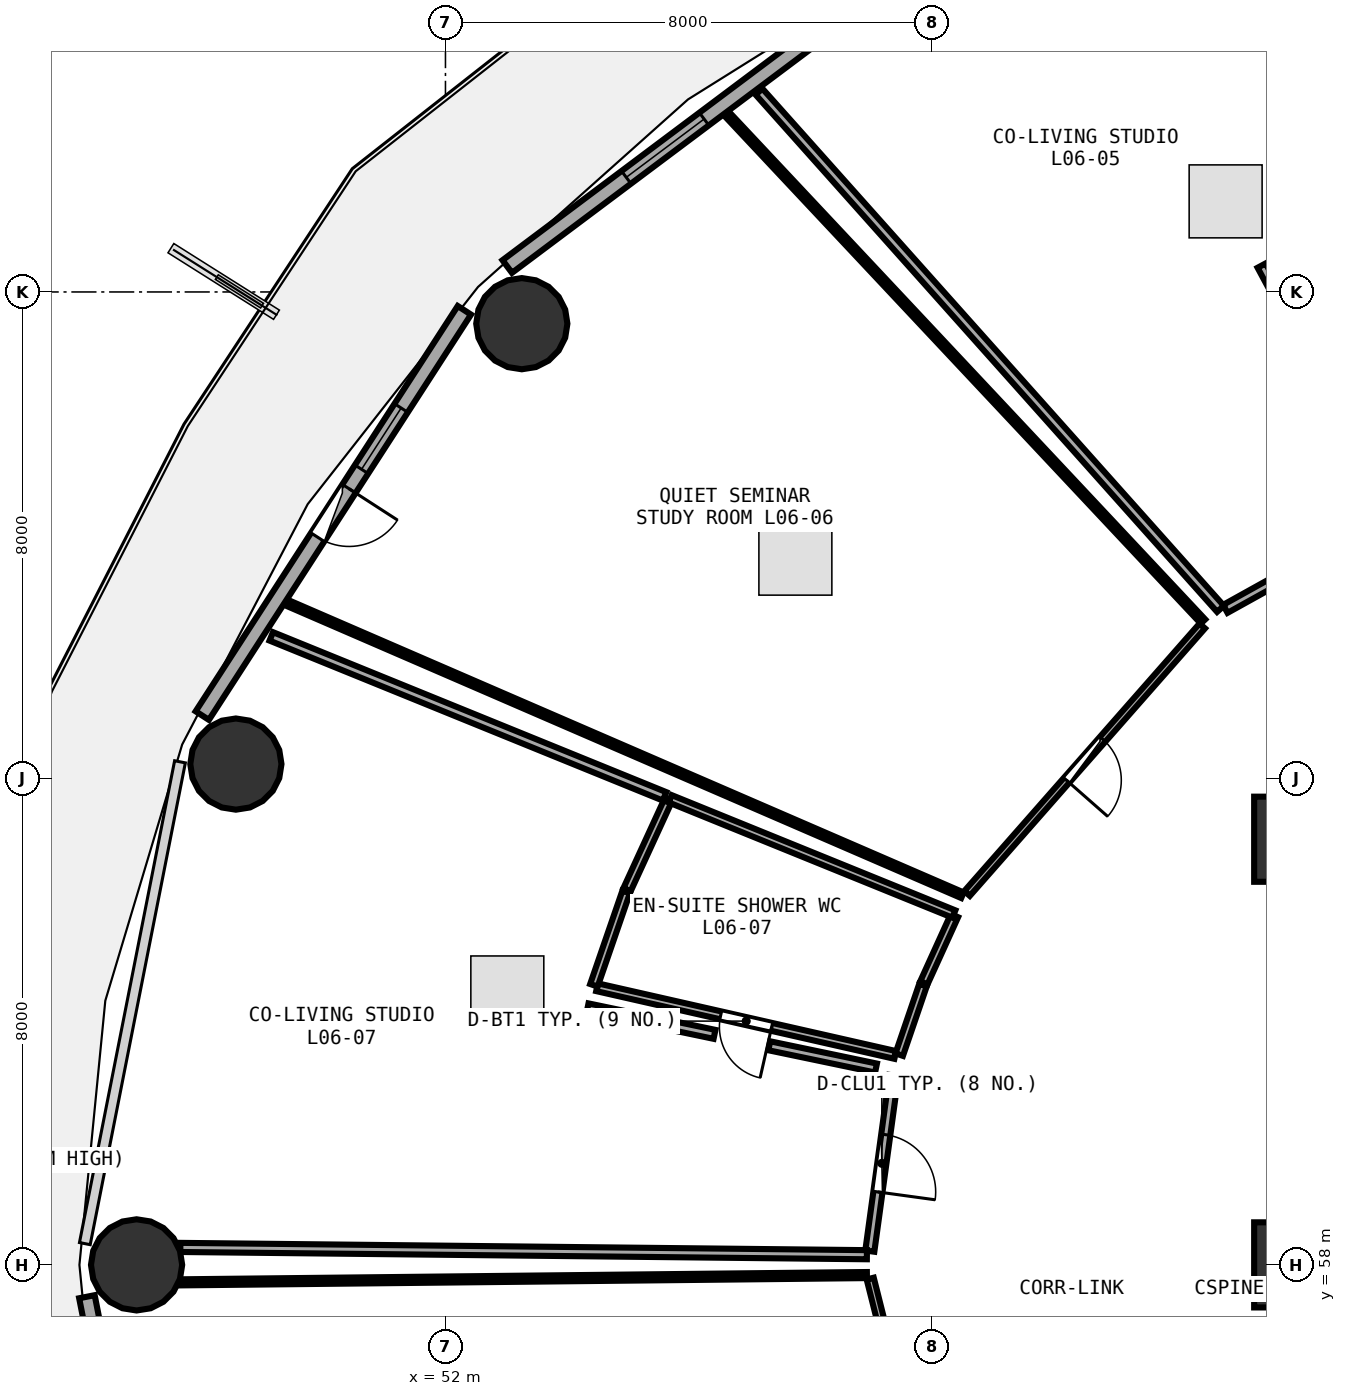
"""IFC4 building model, lengths in metres.
Left out: names, types, materials, properties, quantities, classifications, styles, units other than length and angle.
Written with IfcOpenShell. Run it as: python <this file> out.ifc"""

import sys

from ifc_helpers import new_model, si_unit, direction, frame, frame_2d, origin, origin_2d, place, context, subcontext, project, spatial, rectangle, circle, extrude, element, fill, save


model = new_model("IFC4")
c1 = context("Model", 3, precision=1e-05, world=origin(), true_north=direction((0.0, 1.0)))
c2 = subcontext(c1, "Body", "Model", "MODEL_VIEW")
j1 = project(units=[si_unit("LENGTHUNIT", "METRE"), si_unit("PLANEANGLEUNIT", "RADIAN")], contexts=[c1])
p1 = place(None, origin())
s1 = spatial("IfcSite", under=j1, at=p1, CompositionType="ELEMENT")
p2 = place(p1, origin())
s2 = spatial("IfcBuilding", under=s1, at=p2, CompositionType="ELEMENT")
p3 = place(p2, frame((0.0, 0.0, 26.25)))
s3 = spatial("IfcBuildingStorey", under=s2, at=p3, CompositionType="ELEMENT", Elevation=26.25)
for number, where, z_axis, x_axis in (
    (1, (66.0, 65.0, 0.0), (0.0, 0.0, 1.0), (1.0, 0.0, 0.0)),
    (2, (66.0, 58.0, 0.0), (0.0, 0.0, 1.0), (1.0, 0.0, 0.0)),
):
    element("IfcColumn", number, at=place(p3, frame(where, z_axis=z_axis, x_axis=x_axis)), inside=s3, PredefinedType="PILASTER", context=c2, shape_type="SweptSolid", body=[
        extrude(rectangle(XDim=1.4, YDim=1.4, at=origin_2d()), origin(), (0.0, 0.0, 1.0), 3.75),
    ])
for number, where, z_axis, x_axis in (
    (3, (53.256, 73.478, 0.0), (0.0, 0.0, 1.0), (1.0, 0.0, 0.0)),
    (4, (48.553, 66.236, 0.0), (0.0, 0.0, 1.0), (1.0, 0.0, 0.0)),
    (5, (46.92, 58.0, 0.0), (0.0, 0.0, 1.0), (1.0, 0.0, 0.0)),
):
    element("IfcColumn", number, at=place(p3, frame(where, z_axis=z_axis, x_axis=x_axis)), inside=s3, PredefinedType="COLUMN", context=c2, shape_type="SweptSolid", body=[
        extrude(circle(Radius=0.75, at=origin_2d()), origin(), (0.0, 0.0, 1.0), 3.75),
    ])
p4 = place(p3, frame((59.651, 79.389, 0.0), z_axis=(0.0, 0.0, 1.0), x_axis=(-0.80030733173, -0.599590005569, 0.0)))
e6 = element("IfcWall", 6, at=p4, inside=s3, PredefinedType="SOLIDWALL", context=c2, shape_type="SweptSolid", body=[
    extrude(rectangle(XDim=8.291, YDim=0.26, at=frame_2d((4.145, 0.0))), origin(), (0.0, 0.0, 1.0), 3.475),
])
p5 = place(p4, frame((4.245, 0.0, 0.85)))
e7 = element("IfcOpeningElement", 7, at=p5, cuts=e6, PredefinedType="OPENING", context=c2, shape_type="SweptSolid", body=[
    extrude(rectangle(XDim=1.6, YDim=1.45, at=frame_2d((0.8, 0.725))), frame((0.0, 0.14, 0.0), z_axis=(0.0, -1.0, 0.0), x_axis=(1.0, 0.0, 0.0)), (0.0, 0.0, 1.0), 0.28),
])
p6 = place(p3, frame((52.311, 73.698, 0.0), z_axis=(0.0, 0.0, 1.0), x_axis=(-0.543005114258, -0.839729388488, 0.0)))
e8 = element("IfcWall", 8, at=p6, inside=s3, PredefinedType="SOLIDWALL", context=c2, shape_type="SweptSolid", body=[
    extrude(rectangle(XDim=7.938, YDim=0.26, at=frame_2d((3.969, 0.0))), origin(), (0.0, 0.0, 1.0), 3.475),
])
p7 = place(p6, frame((3.494, 0.0, 0.0)))
e9 = element("IfcOpeningElement", 9, at=p7, cuts=e8, PredefinedType="OPENING", context=c2, shape_type="SweptSolid", body=[
    extrude(rectangle(XDim=0.95, YDim=2.1, at=frame_2d((0.475, 1.05))), frame((0.0, 0.14, 0.0), z_axis=(0.0, -1.0, 0.0), x_axis=(1.0, 0.0, 0.0)), (0.0, 0.0, 1.0), 0.28),
])
p8 = place(p6, frame((1.914, 0.0, 0.85)))
e10 = element("IfcOpeningElement", 10, at=p8, cuts=e8, PredefinedType="OPENING", context=c2, shape_type="SweptSolid", body=[
    extrude(rectangle(XDim=1.2, YDim=1.45, at=frame_2d((0.6, 0.725))), frame((0.0, 0.14, 0.0), z_axis=(0.0, -1.0, 0.0), x_axis=(1.0, 0.0, 0.0)), (0.0, 0.0, 1.0), 0.28),
])
p9 = place(p3, frame((46.104, 57.477, 0.0), z_axis=(0.0, 0.0, 1.0), x_axis=(0.193726159581, -0.98105564322, 0.0)))
e11 = element("IfcWall", 11, at=p9, inside=s3, PredefinedType="SOLIDWALL", context=c2, shape_type="SweptSolid", body=[
    extrude(rectangle(XDim=7.703, YDim=0.26, at=frame_2d((3.851, 0.0))), origin(), (0.0, 0.0, 1.0), 3.475),
])
p10 = place(p9, frame((3.051, 0.0, 0.85)))
e12 = element("IfcOpeningElement", 12, at=p10, cuts=e11, PredefinedType="OPENING", context=c2, shape_type="SweptSolid", body=[
    extrude(rectangle(XDim=1.6, YDim=1.45, at=frame_2d((0.8, 0.725))), frame((0.0, 0.14, 0.0), z_axis=(0.0, -1.0, 0.0), x_axis=(1.0, 0.0, 0.0)), (0.0, 0.0, 1.0), 0.28),
])
p11 = place(p3, frame((67.571, 70.313, 0.0), z_axis=(0.0, 0.0, 1.0), x_axis=(-0.874179278891, -0.48560332408, 0.0)))
e13 = element("IfcWall", 13, at=p11, inside=s3, PredefinedType="PARTITIONING", context=c2, shape_type="SweptSolid", body=[
    extrude(rectangle(XDim=3.14, YDim=0.15, at=frame_2d((1.57, 0.0))), origin(), (0.0, 0.0, 1.0), 3.48),
])
p12 = place(p11, frame((1.095, 0.0, 0.0)))
e14 = element("IfcOpeningElement", 14, at=p12, cuts=e13, PredefinedType="OPENING", context=c2, shape_type="SweptSolid", body=[
    extrude(rectangle(XDim=0.95, YDim=2.08, at=frame_2d((0.475, 1.04))), frame((0.0, 0.085, 0.0), z_axis=(0.0, -1.0, 0.0), x_axis=(1.0, 0.0, 0.0)), (0.0, 0.0, 1.0), 0.17),
])
p13 = place(p3, frame((64.446, 68.507, 0.0), z_axis=(0.0, 0.0, 1.0), x_axis=(-0.660323401664, -0.75098136143, 0.0)))
e15 = element("IfcWall", 15, at=p13, inside=s3, PredefinedType="PARTITIONING", context=c2, shape_type="SweptSolid", body=[
    extrude(rectangle(XDim=5.857, YDim=0.12, at=frame_2d((2.929, 0.0))), origin(), (0.0, 0.0, 1.0), 2.875),
])
p14 = place(p13, frame((2.479, 0.0, 0.0)))
e16 = element("IfcOpeningElement", 16, at=p14, cuts=e15, PredefinedType="OPENING", context=c2, shape_type="SweptSolid", body=[
    extrude(rectangle(XDim=0.9, YDim=2.08, at=frame_2d((0.45, 1.04))), frame((0.0, 0.07, 0.0), z_axis=(0.0, -1.0, 0.0), x_axis=(1.0, 0.0, 0.0)), (0.0, 0.0, 1.0), 0.14),
])
p15 = place(p3, frame((59.397, 61.452, 0.0), z_axis=(0.0, 0.0, 1.0), x_axis=(-0.975187669184, 0.221379786503, 0.0)))
e17 = element("IfcWall", 17, at=p15, inside=s3, PredefinedType="PLUMBINGWALL", context=c2, shape_type="SweptSolid", body=[
    extrude(rectangle(XDim=5.029, YDim=0.13, at=frame_2d((2.514, 0.0))), origin(), (0.0, 0.0, 1.0), 3.175),
])
p16 = place(p15, frame((2.084, 0.0, 0.0)))
e18 = element("IfcOpeningElement", 18, at=p16, cuts=e17, PredefinedType="OPENING", context=c2, shape_type="SweptSolid", body=[
    extrude(rectangle(XDim=0.86, YDim=2.05, at=frame_2d((0.43, 1.025))), frame((0.0, 0.075, 0.0), z_axis=(0.0, -1.0, 0.0), x_axis=(1.0, 0.0, 0.0)), (0.0, 0.0, 1.0), 0.15),
])
p17 = place(p3, frame((59.375, 61.115, 0.0), z_axis=(0.0, 0.0, 1.0), x_axis=(-0.135838186105, -0.990731036758, 0.0)))
e19 = element("IfcWall", 19, at=p17, inside=s3, PredefinedType="PARTITIONING", context=c2, shape_type="SweptSolid", body=[
    extrude(rectangle(XDim=2.915, YDim=0.15, at=frame_2d((1.458, 0.0))), origin(), (0.0, 0.0, 1.0), 3.48),
])
p18 = place(p17, frame((0.983, 0.0, 0.0)))
e20 = element("IfcOpeningElement", 20, at=p18, cuts=e19, PredefinedType="OPENING", context=c2, shape_type="SweptSolid", body=[
    extrude(rectangle(XDim=0.95, YDim=2.08, at=frame_2d((0.475, 1.04))), frame((0.0, 0.085, 0.0), z_axis=(0.0, -1.0, 0.0), x_axis=(1.0, 0.0, 0.0)), (0.0, 0.0, 1.0), 0.17),
])
p19 = place(p3, frame((58.986, 57.775, 0.0), z_axis=(0.0, 0.0, 1.0), x_axis=(0.244192294026, -0.969726829338, 0.0)))
e21 = element("IfcWall", 21, at=p19, inside=s3, PredefinedType="PARTITIONING", context=c2, shape_type="SweptSolid", body=[
    extrude(rectangle(XDim=5.651, YDim=0.12, at=frame_2d((2.825, 0.0))), origin(), (0.0, 0.0, 1.0), 3.48),
])
p20 = place(p19, frame((2.375, 0.0, 0.0)))
e22 = element("IfcOpeningElement", 22, at=p20, cuts=e21, PredefinedType="OPENING", context=c2, shape_type="SweptSolid", body=[
    extrude(rectangle(XDim=0.9, YDim=2.08, at=frame_2d((0.45, 1.04))), frame((0.0, 0.07, 0.0), z_axis=(0.0, -1.0, 0.0), x_axis=(1.0, 0.0, 0.0)), (0.0, 0.0, 1.0), 0.14),
])
p21 = place(p3, frame((64.746, 68.789, 0.0), z_axis=(0.0, 0.0, 1.0), x_axis=(-0.66580890104, 0.746122313897, 0.0)))
e23 = element("IfcWall", 23, at=p21, inside=s3, PredefinedType="PARTITIONING", context=c2, shape_type="SweptSolid", body=[
    extrude(rectangle(XDim=11.399, YDim=0.15, at=frame_2d((5.7, 0.0))), origin(), (0.0, 0.0, 1.0), 2.875),
])
p22 = place(p3, frame((65.423, 74.434, 0.0), z_axis=(0.0, 0.0, 1.0), x_axis=(0.473660949034, -0.880707275637, 0.0)))
e24 = element("IfcWall", 24, at=p22, inside=s3, PredefinedType="PARTITIONING", context=c2, shape_type="SweptSolid", body=[
    extrude(rectangle(XDim=1.891, YDim=0.15, at=frame_2d((0.946, 0.0))), origin(), (0.0, 0.0, 1.0), 3.175),
])
p23 = place(p3, frame((60.502, 64.079, 0.0), z_axis=(0.0, 0.0, 1.0), x_axis=(-0.917695041134, 0.397285554077, 0.0)))
e25 = element("IfcWall", 25, at=p23, inside=s3, PredefinedType="PARTITIONING", context=c2, shape_type="SweptSolid", body=[
    extrude(rectangle(XDim=12.07, YDim=0.1, at=frame_2d((6.035, 0.0))), origin(), (0.0, 0.0, 1.0), 2.875),
])
p24 = place(p3, frame((56.632, 76.922, 0.0), z_axis=(0.0, 0.0, 1.0), x_axis=(0.684261294523, -0.729236916796, 0.0)))
e26 = element("IfcWall", 26, at=p24, inside=s3, PredefinedType="PARTITIONING", context=c2, shape_type="SweptSolid", body=[
    extrude(rectangle(XDim=11.438, YDim=0.1, at=frame_2d((5.719, 0.0))), origin(), (0.0, 0.0, 1.0), 2.875),
])
p25 = place(p3, frame((60.372, 63.745, 0.0), z_axis=(0.0, 0.0, 1.0), x_axis=(-0.4138937247, -0.910325208183, 0.0)))
e27 = element("IfcWall", 27, at=p25, inside=s3, PredefinedType="PLUMBINGWALL", context=c2, shape_type="SweptSolid", body=[
    extrude(rectangle(XDim=1.216, YDim=0.13, at=frame_2d((0.608, 0.0))), origin(), (0.0, 0.0, 1.0), 3.48),
])
p26 = place(p3, frame((59.854, 62.601, 0.0), z_axis=(0.0, 0.0, 1.0), x_axis=(-0.323735286305, -0.946147696928, 0.0)))
e28 = element("IfcWall", 28, at=p26, inside=s3, PredefinedType="PLUMBINGWALL", context=c2, shape_type="SweptSolid", body=[
    extrude(rectangle(XDim=1.208, YDim=0.13, at=frame_2d((0.604, 0.0))), origin(), (0.0, 0.0, 1.0), 3.48),
])
p27 = place(p3, frame((54.441, 62.598, 0.0), z_axis=(0.0, 0.0, 1.0), x_axis=(0.326356647952, 0.945246707657, 0.0)))
e29 = element("IfcWall", 29, at=p27, inside=s3, PredefinedType="PLUMBINGWALL", context=c2, shape_type="SweptSolid", body=[
    extrude(rectangle(XDim=1.624, YDim=0.13, at=frame_2d((0.812, 0.0))), origin(), (0.0, 0.0, 1.0), 3.48),
])
p28 = place(p3, frame((54.986, 64.17, 0.0), z_axis=(0.0, 0.0, 1.0), x_axis=(0.41762687648, 0.908618617486, 0.0)))
e30 = element("IfcWall", 30, at=p28, inside=s3, PredefinedType="PLUMBINGWALL", context=c2, shape_type="SweptSolid", body=[
    extrude(rectangle(XDim=1.634, YDim=0.13, at=frame_2d((0.817, 0.0))), origin(), (0.0, 0.0, 1.0), 2.875),
])
p29 = place(p3, frame((55.696, 65.666, 0.0), z_axis=(0.0, 0.0, 1.0), x_axis=(0.926504606816, -0.376283421835, 0.0)))
e31 = element("IfcWall", 31, at=p29, inside=s3, PredefinedType="PLUMBINGWALL", context=c2, shape_type="SweptSolid", body=[
    extrude(rectangle(XDim=5.036, YDim=0.13, at=frame_2d((2.518, 0.0))), origin(), (0.0, 0.0, 1.0), 2.875),
])
p30 = place(p3, frame((58.931, 58.167, 0.0), z_axis=(0.0, 0.0, 1.0), x_axis=(-0.999943877154, 0.010594458135, 0.0)))
e32 = element("IfcWall", 32, at=p30, inside=s3, PredefinedType="PARTITIONING", context=c2, shape_type="SweptSolid", body=[
    extrude(rectangle(XDim=11.292, YDim=0.15, at=frame_2d((5.646, 0.0))), origin(), (0.0, 0.0, 1.0), 2.875),
])
p31 = place(p3, frame((49.135, 68.336, 0.0), z_axis=(0.0, 0.0, 1.0), x_axis=(0.926325178802, -0.376724917038, 0.0)))
e33 = element("IfcWall", 33, at=p31, inside=s3, PredefinedType="PARTITIONING", context=c2, shape_type="SweptSolid", body=[
    extrude(rectangle(XDim=6.983, YDim=0.15, at=frame_2d((3.492, 0.0))), origin(), (0.0, 0.0, 1.0), 2.875),
])
p32 = place(p3, frame((54.337, 62.227, 0.0), z_axis=(0.0, 0.0, 1.0), x_axis=(0.978922282622, -0.204233113343, 0.0)))
e34 = element("IfcWall", 34, at=p32, inside=s3, PredefinedType="PARTITIONING", context=c2, shape_type="SweptSolid", body=[
    extrude(rectangle(XDim=2.133, YDim=0.15, at=frame_2d((1.066, 0.0))), origin(), (0.0, 0.0, 1.0), 3.175),
])
p33 = place(p3, frame((57.325, 61.603, 0.0), z_axis=(0.0, 0.0, 1.0), x_axis=(0.978929424395, -0.204198878681, 0.0)))
e35 = element("IfcWall", 35, at=p33, inside=s3, PredefinedType="PARTITIONING", context=c2, shape_type="SweptSolid", body=[
    extrude(rectangle(XDim=1.793, YDim=0.15, at=frame_2d((0.897, 0.0))), origin(), (0.0, 0.0, 1.0), 3.235),
])
p34 = place(p3, frame((47.64, 57.713, 0.0), z_axis=(0.0, 0.0, 1.0), x_axis=(0.999943877154, 0.010594458135, 0.0)))
e36 = element("IfcWall", 36, at=p34, inside=s3, PredefinedType="PARTITIONING", context=c2, shape_type="SweptSolid", body=[
    extrude(rectangle(XDim=11.292, YDim=0.1, at=frame_2d((5.646, 0.0))), origin(), (0.0, 0.0, 1.0), 2.875),
])
p35 = place(p5, origin())
e37 = element("IfcWindow", 37, at=p35, inside=s3, PartitioningType="SINGLE_PANEL", PredefinedType="WINDOW", context=c2, shape_type="SweptSolid", body=[
    extrude(rectangle(XDim=1.6, YDim=1.45, at=frame_2d((0.8, 0.725))), frame((0.0, 0.03, 0.0), z_axis=(0.0, -1.0, 0.0), x_axis=(1.0, 0.0, 0.0)), (0.0, 0.0, 1.0), 0.06),
])
fill(e7, e37)
p36 = place(p7, frame((0.95, 0.0, 0.0), z_axis=(0.0, 0.0, 1.0), x_axis=(-1.0, 0.0, 0.0)))
e38 = element("IfcDoor", 38, at=p36, inside=s3, OperationType="SINGLE_SWING_RIGHT", PredefinedType="DOOR", context=c2, shape_type="SweptSolid", body=[
    extrude(rectangle(XDim=0.95, YDim=2.1, at=frame_2d((0.475, 1.05))), frame((0.0, 0.025, 0.0), z_axis=(0.0, -1.0, 0.0), x_axis=(1.0, 0.0, 0.0)), (0.0, 0.0, 1.0), 0.05),
])
fill(e9, e38)
p37 = place(p8, origin())
e39 = element("IfcWindow", 39, at=p37, inside=s3, PartitioningType="SINGLE_PANEL", PredefinedType="WINDOW", context=c2, shape_type="SweptSolid", body=[
    extrude(rectangle(XDim=1.2, YDim=1.45, at=frame_2d((0.6, 0.725))), frame((0.0, 0.03, 0.0), z_axis=(0.0, -1.0, 0.0), x_axis=(1.0, 0.0, 0.0)), (0.0, 0.0, 1.0), 0.06),
])
fill(e10, e39)
p38 = place(p14, origin())
e40 = element("IfcDoor", 40, at=p38, inside=s3, OperationType="SINGLE_SWING_RIGHT", PredefinedType="DOOR", context=c2, shape_type="SweptSolid", body=[
    extrude(rectangle(XDim=0.9, YDim=2.08, at=frame_2d((0.45, 1.04))), frame((0.0, 0.025, 0.0), z_axis=(0.0, -1.0, 0.0), x_axis=(1.0, 0.0, 0.0)), (0.0, 0.0, 1.0), 0.05),
])
fill(e16, e40)
p39 = place(p16, origin())
e41 = element("IfcDoor", 41, at=p39, inside=s3, OperationType="SINGLE_SWING_LEFT", PredefinedType="DOOR", context=c2, shape_type="SweptSolid", body=[
    extrude(rectangle(XDim=0.86, YDim=2.05, at=frame_2d((0.43, 1.025))), frame((0.0, 0.025, 0.0), z_axis=(0.0, -1.0, 0.0), x_axis=(1.0, 0.0, 0.0)), (0.0, 0.0, 1.0), 0.05),
])
fill(e18, e41)
p40 = place(p18, origin())
e42 = element("IfcDoor", 42, at=p40, inside=s3, OperationType="SINGLE_SWING_RIGHT", PredefinedType="DOOR", context=c2, shape_type="SweptSolid", body=[
    extrude(rectangle(XDim=0.95, YDim=2.08, at=frame_2d((0.475, 1.04))), frame((0.0, 0.025, 0.0), z_axis=(0.0, -1.0, 0.0), x_axis=(1.0, 0.0, 0.0)), (0.0, 0.0, 1.0), 0.05),
])
fill(e20, e42)
save(model, sys.argv[1])
